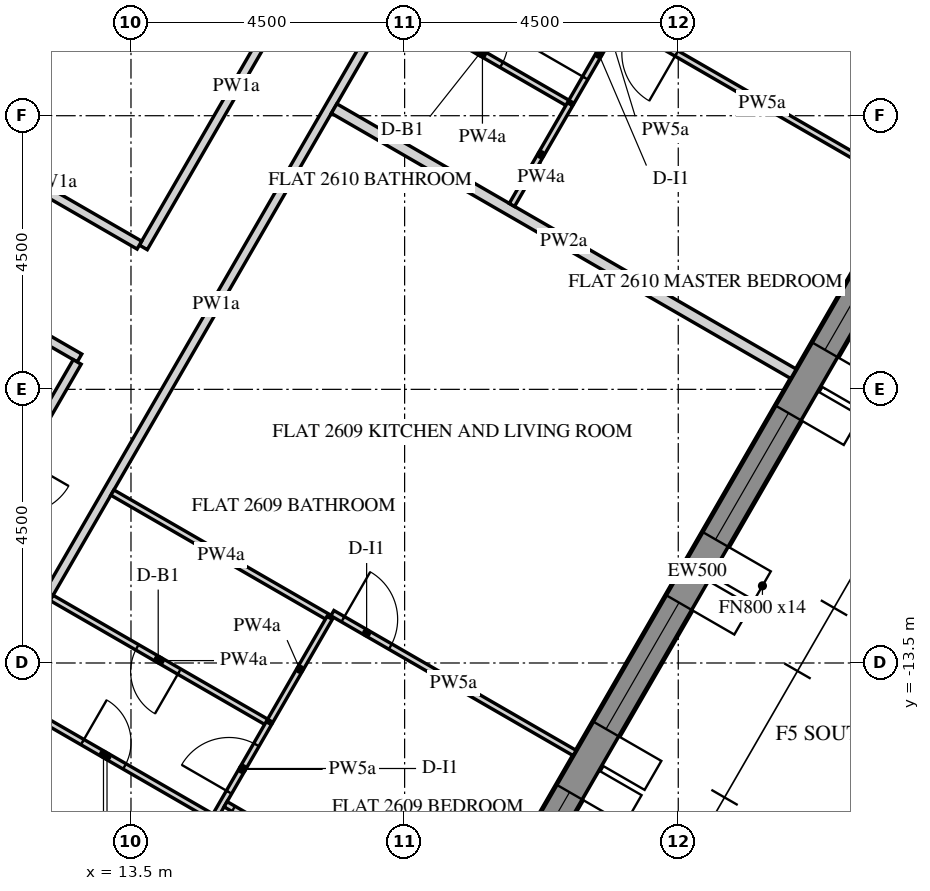
"""IFC4 building model, lengths in metres.
Left out: names, types, materials, properties, quantities, classifications, styles, units other than length and angle.
Written with IfcOpenShell. Run it as: python <this file> out.ifc"""

import sys

from ifc_helpers import new_model, si_unit, direction, frame, frame_2d, origin, place, context, subcontext, project, spatial, polyline, rectangle, outline, extrude, element, fill, save


model = new_model("IFC4")
c1 = context("Model", 3, precision=1e-05, world=origin(), true_north=direction((0.0, 1.0)))
c2 = subcontext(c1, "Body", "Model", "MODEL_VIEW")
j1 = project(units=[si_unit("LENGTHUNIT", "METRE"), si_unit("PLANEANGLEUNIT", "RADIAN")], contexts=[c1])
p1 = place(None, origin())
s1 = spatial("IfcSite", under=j1, at=p1, CompositionType="ELEMENT")
p2 = place(p1, origin())
s2 = spatial("IfcBuilding", under=s1, at=p2, CompositionType="ELEMENT")
p3 = place(p2, frame((0.0, 0.0, 326.4)))
s3 = spatial("IfcBuildingStorey", under=s2, at=p3, CompositionType="ELEMENT", Elevation=326.4)
p4 = place(p3, frame((16.451, -23.005, -0.15), z_axis=(0.0, 0.0, 1.0), x_axis=(0.500003737743, 0.866023245787, 0.0)))
e1 = element("IfcWall", 1, at=p4, inside=s3, PredefinedType="SOLIDWALL", context=c2, shape_type="SweptSolid", body=[
    extrude(outline(polyline([(-0.021, -0.25), (25.468, -0.25), (25.421, 0.25), (0.021, 0.25), (-0.021, -0.25)])), origin(), (0.0, 0.0, 1.0), 3.9),
])
p5 = place(p4, frame((2.522, 0.0, 0.75)))
e2 = element("IfcOpeningElement", 2, at=p5, cuts=e1, PredefinedType="OPENING", context=c2, shape_type="SweptSolid", body=[
    extrude(rectangle(XDim=2.4, YDim=2.7, at=frame_2d((1.2, 1.35))), frame((0.0, 0.26, 0.0), z_axis=(0.0, -1.0, 0.0), x_axis=(1.0, 0.0, 0.0)), (0.0, 0.0, 1.0), 0.52),
])
p6 = place(p4, frame((6.122, 0.0, 0.75)))
e3 = element("IfcOpeningElement", 3, at=p6, cuts=e1, PredefinedType="OPENING", context=c2, shape_type="SweptSolid", body=[
    extrude(rectangle(XDim=2.4, YDim=2.7, at=frame_2d((1.2, 1.35))), frame((0.0, 0.26, 0.0), z_axis=(0.0, -1.0, 0.0), x_axis=(1.0, 0.0, 0.0)), (0.0, 0.0, 1.0), 0.52),
])
p7 = place(p4, frame((9.722, 0.0, 0.75)))
e4 = element("IfcOpeningElement", 4, at=p7, cuts=e1, PredefinedType="OPENING", context=c2, shape_type="SweptSolid", body=[
    extrude(rectangle(XDim=2.4, YDim=2.7, at=frame_2d((1.2, 1.35))), frame((0.0, 0.26, 0.0), z_axis=(0.0, -1.0, 0.0), x_axis=(1.0, 0.0, 0.0)), (0.0, 0.0, 1.0), 0.52),
])
p8 = place(p4, frame((13.323, 0.0, 0.75)))
e5 = element("IfcOpeningElement", 5, at=p8, cuts=e1, PredefinedType="OPENING", context=c2, shape_type="SweptSolid", body=[
    extrude(rectangle(XDim=2.4, YDim=2.7, at=frame_2d((1.2, 1.35))), frame((0.0, 0.26, 0.0), z_axis=(0.0, -1.0, 0.0), x_axis=(1.0, 0.0, 0.0)), (0.0, 0.0, 1.0), 0.52),
])
p9 = place(p4, frame((16.922, 0.0, 0.75)))
e6 = element("IfcOpeningElement", 6, at=p9, cuts=e1, PredefinedType="OPENING", context=c2, shape_type="SweptSolid", body=[
    extrude(rectangle(XDim=2.4, YDim=2.7, at=frame_2d((1.2, 1.35))), frame((0.0, 0.26, 0.0), z_axis=(0.0, -1.0, 0.0), x_axis=(1.0, 0.0, 0.0)), (0.0, 0.0, 1.0), 0.52),
])
p10 = place(p4, frame((20.522, 0.0, 0.75)))
e7 = element("IfcOpeningElement", 7, at=p10, cuts=e1, PredefinedType="OPENING", context=c2, shape_type="SweptSolid", body=[
    extrude(rectangle(XDim=2.4, YDim=2.7, at=frame_2d((1.2, 1.35))), frame((0.0, 0.26, 0.0), z_axis=(0.0, -1.0, 0.0), x_axis=(1.0, 0.0, 0.0)), (0.0, 0.0, 1.0), 0.52),
])
p11 = place(p3, frame((6.235, -10.8, -0.15), z_axis=(0.0, 0.0, 1.0), x_axis=(0.499996419489, 0.866027470984, 0.0)))
e8 = element("IfcWall", 8, at=p11, inside=s3, PredefinedType="SHEAR", context=c2, shape_type="SweptSolid", body=[
    extrude(outline(polyline([(-0.115, -0.2), (12.586, -0.2), (12.355, 0.2), (0.115, 0.2), (-0.115, -0.2)])), origin(), (0.0, 0.0, 1.0), 3.9),
])
p12 = place(p11, frame((5.364, 0.0, 0.15)))
e9 = element("IfcOpeningElement", 9, at=p12, cuts=e8, PredefinedType="OPENING", context=c2, shape_type="SweptSolid", body=[
    extrude(rectangle(XDim=1.8, YDim=2.4, at=frame_2d((0.9, 1.2))), frame((0.0, 0.21, 0.0), z_axis=(0.0, -1.0, 0.0), x_axis=(1.0, 0.0, 0.0)), (0.0, 0.0, 1.0), 0.42),
])
p13 = place(p3, frame((6.351, -11.0, -0.15), z_axis=(0.0, 0.0, 1.0), x_axis=(0.499998894578, -0.866026041999, 0.0)))
e10 = element("IfcWall", 10, at=p13, inside=s3, PredefinedType="SHEAR", context=c2, shape_type="SweptSolid", body=[
    extrude(rectangle(XDim=15.544, YDim=0.4, at=frame_2d((7.772, 0.0))), origin(), (0.0, 0.0, 1.0), 3.9),
])
p14 = place(p13, frame((6.872, 0.0, 0.15)))
e11 = element("IfcOpeningElement", 11, at=p14, cuts=e10, PredefinedType="OPENING", context=c2, shape_type="SweptSolid", body=[
    extrude(rectangle(XDim=1.8, YDim=2.4, at=frame_2d((0.9, 1.2))), frame((0.0, 0.21, 0.0), z_axis=(0.0, -1.0, 0.0), x_axis=(1.0, 0.0, 0.0)), (0.0, 0.0, 1.0), 0.42),
])
p15 = place(p3, frame((11.229, -13.951, 0.0), z_axis=(0.0, 0.0, 1.0), x_axis=(0.499997948852, 0.866026588012, 0.0)))
e12 = element("IfcWall", 12, at=p15, inside=s3, PredefinedType="PARTITIONING", context=c2, shape_type="SweptSolid", body=[
    extrude(rectangle(XDim=14.677, YDim=0.15, at=frame_2d((7.339, 0.0))), origin(), (0.0, 0.0, 1.0), 2.838),
])
p16 = place(p15, frame((0.4, 0.0, 0.0)))
e13 = element("IfcOpeningElement", 13, at=p16, cuts=e12, PredefinedType="OPENING", context=c2, shape_type="SweptSolid", body=[
    extrude(rectangle(XDim=1.0, YDim=2.1, at=frame_2d((0.5, 1.05))), frame((0.0, 0.085, 0.0), z_axis=(0.0, -1.0, 0.0), x_axis=(1.0, 0.0, 0.0)), (0.0, 0.0, 1.0), 0.17),
])
p17 = place(p15, frame((13.527, 0.0, 0.0)))
e14 = element("IfcOpeningElement", 14, at=p17, cuts=e12, PredefinedType="OPENING", context=c2, shape_type="SweptSolid", body=[
    extrude(rectangle(XDim=1.0, YDim=2.1, at=frame_2d((0.5, 1.05))), frame((0.0, 0.085, 0.0), z_axis=(0.0, -1.0, 0.0), x_axis=(1.0, 0.0, 0.0)), (0.0, 0.0, 1.0), 0.17),
])
p18 = place(p3, frame((9.016, -6.384, 0.0), z_axis=(0.0, 0.0, 1.0), x_axis=(0.866023935413, -0.500002543286, 0.0)))
e15 = element("IfcWall", 15, at=p18, inside=s3, PredefinedType="PARTITIONING", context=c2, shape_type="SweptSolid", body=[
    extrude(rectangle(XDim=4.2, YDim=0.15, at=frame_2d((2.1, 0.0))), origin(), (0.0, 0.0, 1.0), 2.838),
])
p19 = place(p3, frame((12.615, -8.549, 0.0), z_axis=(0.0, 0.0, 1.0), x_axis=(-0.499985850067, -0.866033573098, 0.0)))
e16 = element("IfcWall", 16, at=p19, inside=s3, PredefinedType="PARTITIONING", context=c2, shape_type="SweptSolid", body=[
    extrude(rectangle(XDim=4.573, YDim=0.15, at=frame_2d((2.287, 0.0))), origin(), (0.0, 0.0, 1.0), 2.838),
])
p20 = place(p19, frame((1.837, 0.0, 0.0)))
e17 = element("IfcOpeningElement", 17, at=p20, cuts=e16, PredefinedType="OPENING", context=c2, shape_type="SweptSolid", body=[
    extrude(rectangle(XDim=0.9, YDim=2.1, at=frame_2d((0.45, 1.05))), frame((0.0, 0.085, 0.0), z_axis=(0.0, -1.0, 0.0), x_axis=(1.0, 0.0, 0.0)), (0.0, 0.0, 1.0), 0.17),
])
p21 = place(p3, frame((16.758, -1.374, 0.0), z_axis=(0.0, 0.0, 1.0), x_axis=(-0.499980689202, -0.866036552592, 0.0)))
e18 = element("IfcWall", 18, at=p21, inside=s3, PredefinedType="PARTITIONING", context=c2, shape_type="SweptSolid", body=[
    extrude(rectangle(XDim=6.111, YDim=0.15, at=frame_2d((3.055, 0.0))), origin(), (0.0, 0.0, 1.0), 2.838),
])
p22 = place(p3, frame((13.638, -6.628, 0.0), z_axis=(0.0, 0.0, 1.0), x_axis=(-0.866034795751, 0.499983732284, 0.0)))
e19 = element("IfcWall", 19, at=p22, inside=s3, PredefinedType="PARTITIONING", context=c2, shape_type="SweptSolid", body=[
    extrude(rectangle(XDim=4.125, YDim=0.15, at=frame_2d((2.062, 0.0))), origin(), (0.0, 0.0, 1.0), 2.838),
])
p23 = place(p3, frame((13.194, -10.697, 0.0), z_axis=(0.0, 0.0, 1.0), x_axis=(0.866019999656, -0.500009360108, 0.0)))
e20 = element("IfcWall", 20, at=p23, inside=s3, PredefinedType="PARTITIONING", context=c2, shape_type="SweptSolid", body=[
    extrude(rectangle(XDim=4.125, YDim=0.1, at=frame_2d((2.062, 0.0))), origin(), (0.0, 0.0, 1.0), 2.838),
])
p24 = place(p3, frame((16.812, -12.68, 0.0), z_axis=(0.0, 0.0, 1.0), x_axis=(0.866030038822, -0.499991971794, 0.0)))
e21 = element("IfcWall", 21, at=p24, inside=s3, PredefinedType="PARTITIONING", context=c2, shape_type="SweptSolid", body=[
    extrude(rectangle(XDim=4.6, YDim=0.1, at=frame_2d((2.3, 0.0))), origin(), (0.0, 0.0, 1.0), 2.838),
])
p25 = place(p24, frame((0.2, 0.0, 0.0)))
e22 = element("IfcOpeningElement", 22, at=p25, cuts=e21, PredefinedType="OPENING", context=c2, shape_type="SweptSolid", body=[
    extrude(rectangle(XDim=0.9, YDim=2.1, at=frame_2d((0.45, 1.05))), frame((0.0, 0.06, 0.0), z_axis=(0.0, -1.0, 0.0), x_axis=(1.0, 0.0, 0.0)), (0.0, 0.0, 1.0), 0.12),
])
p26 = place(p3, frame((24.396, -8.745, 0.0), z_axis=(0.0, 0.0, 1.0), x_axis=(-0.866018297078, 0.500012308975, 0.0)))
e23 = element("IfcWall", 23, at=p26, inside=s3, PredefinedType="PARTITIONING", context=c2, shape_type="SweptSolid", body=[
    extrude(rectangle(XDim=8.725, YDim=0.18, at=frame_2d((4.362, 0.0))), origin(), (0.0, 0.0, 1.0), 2.838),
])
p27 = place(p3, frame((15.766, -14.492, 0.0), z_axis=(0.0, 0.0, 1.0), x_axis=(-0.866019999656, 0.500009360108, 0.0)))
e24 = element("IfcWall", 24, at=p27, inside=s3, PredefinedType="PARTITIONING", context=c2, shape_type="SweptSolid", body=[
    extrude(rectangle(XDim=4.125, YDim=0.1, at=frame_2d((2.062, 0.0))), origin(), (0.0, 0.0, 1.0), 2.838),
])
p28 = place(p27, frame((1.7, 0.0, 0.0)))
e25 = element("IfcOpeningElement", 25, at=p28, cuts=e24, PredefinedType="OPENING", context=c2, shape_type="SweptSolid", body=[
    extrude(rectangle(XDim=0.8, YDim=2.1, at=frame_2d((0.4, 1.05))), frame((0.0, 0.06, 0.0), z_axis=(0.0, -1.0, 0.0), x_axis=(1.0, 0.0, 0.0)), (0.0, 0.0, 1.0), 0.12),
])
p29 = place(p3, frame((14.89, -16.009, 0.0), z_axis=(0.0, 0.0, 1.0), x_axis=(0.499971461383, 0.866041879935, 0.0)))
e26 = element("IfcWall", 26, at=p29, inside=s3, PredefinedType="PARTITIONING", context=c2, shape_type="SweptSolid", body=[
    extrude(rectangle(XDim=1.754, YDim=0.1, at=frame_2d((0.877, 0.0))), origin(), (0.0, 0.0, 1.0), 2.838),
])
p30 = place(p29, frame((0.444, 0.0, 0.0)))
e27 = element("IfcOpeningElement", 27, at=p30, cuts=e26, PredefinedType="OPENING", context=c2, shape_type="SweptSolid", body=[
    extrude(rectangle(XDim=0.9, YDim=2.1, at=frame_2d((0.45, 1.05))), frame((0.0, 0.06, 0.0), z_axis=(0.0, -1.0, 0.0), x_axis=(1.0, 0.0, 0.0)), (0.0, 0.0, 1.0), 0.12),
])
p31 = place(p3, frame((11.345, -14.018, 0.0), z_axis=(0.0, 0.0, 1.0), x_axis=(0.866028600041, -0.49999446388, 0.0)))
e28 = element("IfcWall", 28, at=p31, inside=s3, PredefinedType="PARTITIONING", context=c2, shape_type="SweptSolid", body=[
    extrude(rectangle(XDim=4.066, YDim=0.1, at=frame_2d((2.033, 0.0))), origin(), (0.0, 0.0, 1.0), 2.838),
])
p32 = place(p31, frame((1.566, 0.0, 0.0)))
e29 = element("IfcOpeningElement", 29, at=p32, cuts=e28, PredefinedType="OPENING", context=c2, shape_type="SweptSolid", body=[
    extrude(rectangle(XDim=0.8, YDim=2.1, at=frame_2d((0.4, 1.05))), frame((0.0, 0.06, 0.0), z_axis=(0.0, -1.0, 0.0), x_axis=(1.0, 0.0, 0.0)), (0.0, 0.0, 1.0), 0.12),
])
p33 = place(p3, frame((15.79, -14.45, 0.0), z_axis=(0.0, 0.0, 1.0), x_axis=(0.500036104519, 0.866004557827, 0.0)))
e30 = element("IfcWall", 30, at=p33, inside=s3, PredefinedType="PARTITIONING", context=c2, shape_type="SweptSolid", body=[
    extrude(rectangle(XDim=1.954, YDim=0.1, at=frame_2d((0.977, 0.0))), origin(), (0.0, 0.0, 1.0), 2.838),
])
p34 = place(p3, frame((18.996, -18.098, 0.0), z_axis=(0.0, 0.0, 1.0), x_axis=(-0.866035472144, 0.499982560684, 0.0)))
e31 = element("IfcWall", 31, at=p34, inside=s3, PredefinedType="PARTITIONING", context=c2, shape_type="SweptSolid", body=[
    extrude(rectangle(XDim=4.55, YDim=0.1, at=frame_2d((2.275, 0.0))), origin(), (0.0, 0.0, 1.0), 2.838),
])
p35 = place(p34, frame((3.5, 0.0, 0.0)))
e32 = element("IfcOpeningElement", 32, at=p35, cuts=e31, PredefinedType="OPENING", context=c2, shape_type="SweptSolid", body=[
    extrude(rectangle(XDim=0.9, YDim=2.1, at=frame_2d((0.45, 1.05))), frame((0.0, 0.06, 0.0), z_axis=(0.0, -1.0, 0.0), x_axis=(1.0, 0.0, 0.0)), (0.0, 0.0, 1.0), 0.12),
])
p36 = place(p3, frame((17.84, -2.65, 0.0), z_axis=(0.0, 0.0, 1.0), x_axis=(0.866002163101, -0.500040251884, 0.0)))
e33 = element("IfcWall", 33, at=p36, inside=s3, PredefinedType="PARTITIONING", context=c2, shape_type="SweptSolid", body=[
    extrude(rectangle(XDim=3.325, YDim=0.1, at=frame_2d((1.663, 0.0))), origin(), (0.0, 0.0, 1.0), 2.838),
])
p37 = place(p36, frame((1.225, 0.0, 0.0)))
e34 = element("IfcOpeningElement", 34, at=p37, cuts=e33, PredefinedType="OPENING", context=c2, shape_type="SweptSolid", body=[
    extrude(rectangle(XDim=0.8, YDim=2.1, at=frame_2d((0.4, 1.05))), frame((0.0, 0.06, 0.0), z_axis=(0.0, -1.0, 0.0), x_axis=(1.0, 0.0, 0.0)), (0.0, 0.0, 1.0), 0.12),
])
p38 = place(p3, frame((20.743, -4.271, 0.0), z_axis=(0.0, 0.0, 1.0), x_axis=(0.500014808323, 0.866016854026, 0.0)))
e35 = element("IfcWall", 35, at=p38, inside=s3, PredefinedType="PARTITIONING", context=c2, shape_type="SweptSolid", body=[
    extrude(rectangle(XDim=2.554, YDim=0.1, at=frame_2d((1.277, 0.0))), origin(), (0.0, 0.0, 1.0), 2.838),
])
p39 = place(p38, frame((0.452, 0.0, 0.0)))
e36 = element("IfcOpeningElement", 36, at=p39, cuts=e35, PredefinedType="OPENING", context=c2, shape_type="SweptSolid", body=[
    extrude(rectangle(XDim=0.9, YDim=2.1, at=frame_2d((0.45, 1.05))), frame((0.0, 0.06, 0.0), z_axis=(0.0, -1.0, 0.0), x_axis=(1.0, 0.0, 0.0)), (0.0, 0.0, 1.0), 0.12),
])
p40 = place(p3, frame((19.764, -5.967, 0.0), z_axis=(0.0, 0.0, 1.0), x_axis=(0.500039310002, 0.866002706955, 0.0)))
e37 = element("IfcWall", 37, at=p40, inside=s3, PredefinedType="PARTITIONING", context=c2, shape_type="SweptSolid", body=[
    extrude(rectangle(XDim=1.912, YDim=0.1, at=frame_2d((0.956, 0.0))), origin(), (0.0, 0.0, 1.0), 2.838),
])
p41 = place(p3, frame((26.196, -5.627, 0.0), z_axis=(0.0, 0.0, 1.0), x_axis=(-0.866024483152, 0.500001594578, 0.0)))
e38 = element("IfcWall", 38, at=p41, inside=s3, PredefinedType="PARTITIONING", context=c2, shape_type="SweptSolid", body=[
    extrude(rectangle(XDim=5.35, YDim=0.1, at=frame_2d((2.675, 0.0))), origin(), (0.0, 0.0, 1.0), 2.838),
])
p42 = place(p41, frame((4.3, 0.0, 0.0)))
e39 = element("IfcOpeningElement", 39, at=p42, cuts=e38, PredefinedType="OPENING", context=c2, shape_type="SweptSolid", body=[
    extrude(rectangle(XDim=0.9, YDim=2.1, at=frame_2d((0.45, 1.05))), frame((0.0, 0.06, 0.0), z_axis=(0.0, -1.0, 0.0), x_axis=(1.0, 0.0, 0.0)), (0.0, 0.0, 1.0), 0.12),
])
p43 = place(p6, frame((0.0, 0.18, 0.0)))
e40 = element("IfcWindow", 40, at=p43, inside=s3, PartitioningType="DOUBLE_PANEL_VERTICAL", PredefinedType="WINDOW", context=c2, shape_type="SweptSolid", body=[
    extrude(rectangle(XDim=2.4, YDim=2.7, at=frame_2d((1.2, 1.35))), frame((0.0, 0.03, 0.0), z_axis=(0.0, -1.0, 0.0), x_axis=(1.0, 0.0, 0.0)), (0.0, 0.0, 1.0), 0.06),
])
fill(e3, e40)
p44 = place(p7, frame((0.0, 0.18, 0.0)))
e41 = element("IfcWindow", 41, at=p44, inside=s3, PartitioningType="DOUBLE_PANEL_VERTICAL", PredefinedType="WINDOW", context=c2, shape_type="SweptSolid", body=[
    extrude(rectangle(XDim=2.4, YDim=2.7, at=frame_2d((1.2, 1.35))), frame((0.0, 0.03, 0.0), z_axis=(0.0, -1.0, 0.0), x_axis=(1.0, 0.0, 0.0)), (0.0, 0.0, 1.0), 0.06),
])
fill(e4, e41)
p45 = place(p8, frame((0.0, 0.18, 0.0)))
e42 = element("IfcWindow", 42, at=p45, inside=s3, PartitioningType="DOUBLE_PANEL_VERTICAL", PredefinedType="WINDOW", context=c2, shape_type="SweptSolid", body=[
    extrude(rectangle(XDim=2.4, YDim=2.7, at=frame_2d((1.2, 1.35))), frame((0.0, 0.03, 0.0), z_axis=(0.0, -1.0, 0.0), x_axis=(1.0, 0.0, 0.0)), (0.0, 0.0, 1.0), 0.06),
])
fill(e5, e42)
p46 = place(p9, frame((0.0, 0.18, 0.0)))
e43 = element("IfcWindow", 43, at=p46, inside=s3, PartitioningType="DOUBLE_PANEL_VERTICAL", PredefinedType="WINDOW", context=c2, shape_type="SweptSolid", body=[
    extrude(rectangle(XDim=2.4, YDim=2.7, at=frame_2d((1.2, 1.35))), frame((0.0, 0.03, 0.0), z_axis=(0.0, -1.0, 0.0), x_axis=(1.0, 0.0, 0.0)), (0.0, 0.0, 1.0), 0.06),
])
fill(e6, e43)
p47 = place(p28, origin())
e44 = element("IfcDoor", 44, at=p47, inside=s3, OperationType="SINGLE_SWING_LEFT", PredefinedType="DOOR", context=c2, shape_type="SweptSolid", body=[
    extrude(rectangle(XDim=0.8, YDim=2.1, at=frame_2d((0.4, 1.05))), frame((0.0, 0.025, 0.0), z_axis=(0.0, -1.0, 0.0), x_axis=(1.0, 0.0, 0.0)), (0.0, 0.0, 1.0), 0.05),
])
fill(e25, e44)
p48 = place(p30, origin())
e45 = element("IfcDoor", 45, at=p48, inside=s3, OperationType="SINGLE_SWING_RIGHT", PredefinedType="DOOR", context=c2, shape_type="SweptSolid", body=[
    extrude(rectangle(XDim=0.9, YDim=2.1, at=frame_2d((0.45, 1.05))), frame((0.0, 0.025, 0.0), z_axis=(0.0, -1.0, 0.0), x_axis=(1.0, 0.0, 0.0)), (0.0, 0.0, 1.0), 0.05),
])
fill(e27, e45)
p49 = place(p35, origin())
e46 = element("IfcDoor", 46, at=p49, inside=s3, OperationType="SINGLE_SWING_RIGHT", PredefinedType="DOOR", context=c2, shape_type="SweptSolid", body=[
    extrude(rectangle(XDim=0.9, YDim=2.1, at=frame_2d((0.45, 1.05))), frame((0.0, 0.025, 0.0), z_axis=(0.0, -1.0, 0.0), x_axis=(1.0, 0.0, 0.0)), (0.0, 0.0, 1.0), 0.05),
])
fill(e32, e46)
p50 = place(p25, origin())
e47 = element("IfcDoor", 47, at=p50, inside=s3, OperationType="SINGLE_SWING_RIGHT", PredefinedType="DOOR", context=c2, shape_type="SweptSolid", body=[
    extrude(rectangle(XDim=0.9, YDim=2.1, at=frame_2d((0.45, 1.05))), frame((0.0, 0.025, 0.0), z_axis=(0.0, -1.0, 0.0), x_axis=(1.0, 0.0, 0.0)), (0.0, 0.0, 1.0), 0.05),
])
fill(e22, e47)
p51 = place(p32, origin())
e48 = element("IfcDoor", 48, at=p51, inside=s3, OperationType="SINGLE_SWING_RIGHT", PredefinedType="DOOR", context=c2, shape_type="SweptSolid", body=[
    extrude(rectangle(XDim=0.8, YDim=2.1, at=frame_2d((0.4, 1.05))), frame((0.0, 0.025, 0.0), z_axis=(0.0, -1.0, 0.0), x_axis=(1.0, 0.0, 0.0)), (0.0, 0.0, 1.0), 0.05),
])
fill(e29, e48)
p52 = place(p37, origin())
e49 = element("IfcDoor", 49, at=p52, inside=s3, OperationType="SINGLE_SWING_RIGHT", PredefinedType="DOOR", context=c2, shape_type="SweptSolid", body=[
    extrude(rectangle(XDim=0.8, YDim=2.1, at=frame_2d((0.4, 1.05))), frame((0.0, 0.025, 0.0), z_axis=(0.0, -1.0, 0.0), x_axis=(1.0, 0.0, 0.0)), (0.0, 0.0, 1.0), 0.05),
])
fill(e34, e49)
p53 = place(p39, origin())
e50 = element("IfcDoor", 50, at=p53, inside=s3, OperationType="SINGLE_SWING_LEFT", PredefinedType="DOOR", context=c2, shape_type="SweptSolid", body=[
    extrude(rectangle(XDim=0.9, YDim=2.1, at=frame_2d((0.45, 1.05))), frame((0.0, 0.025, 0.0), z_axis=(0.0, -1.0, 0.0), x_axis=(1.0, 0.0, 0.0)), (0.0, 0.0, 1.0), 0.05),
])
fill(e36, e50)
p54 = place(p42, origin())
e51 = element("IfcDoor", 51, at=p54, inside=s3, OperationType="SINGLE_SWING_RIGHT", PredefinedType="DOOR", context=c2, shape_type="SweptSolid", body=[
    extrude(rectangle(XDim=0.9, YDim=2.1, at=frame_2d((0.45, 1.05))), frame((0.0, 0.025, 0.0), z_axis=(0.0, -1.0, 0.0), x_axis=(1.0, 0.0, 0.0)), (0.0, 0.0, 1.0), 0.05),
])
fill(e39, e51)
save(model, sys.argv[1])
